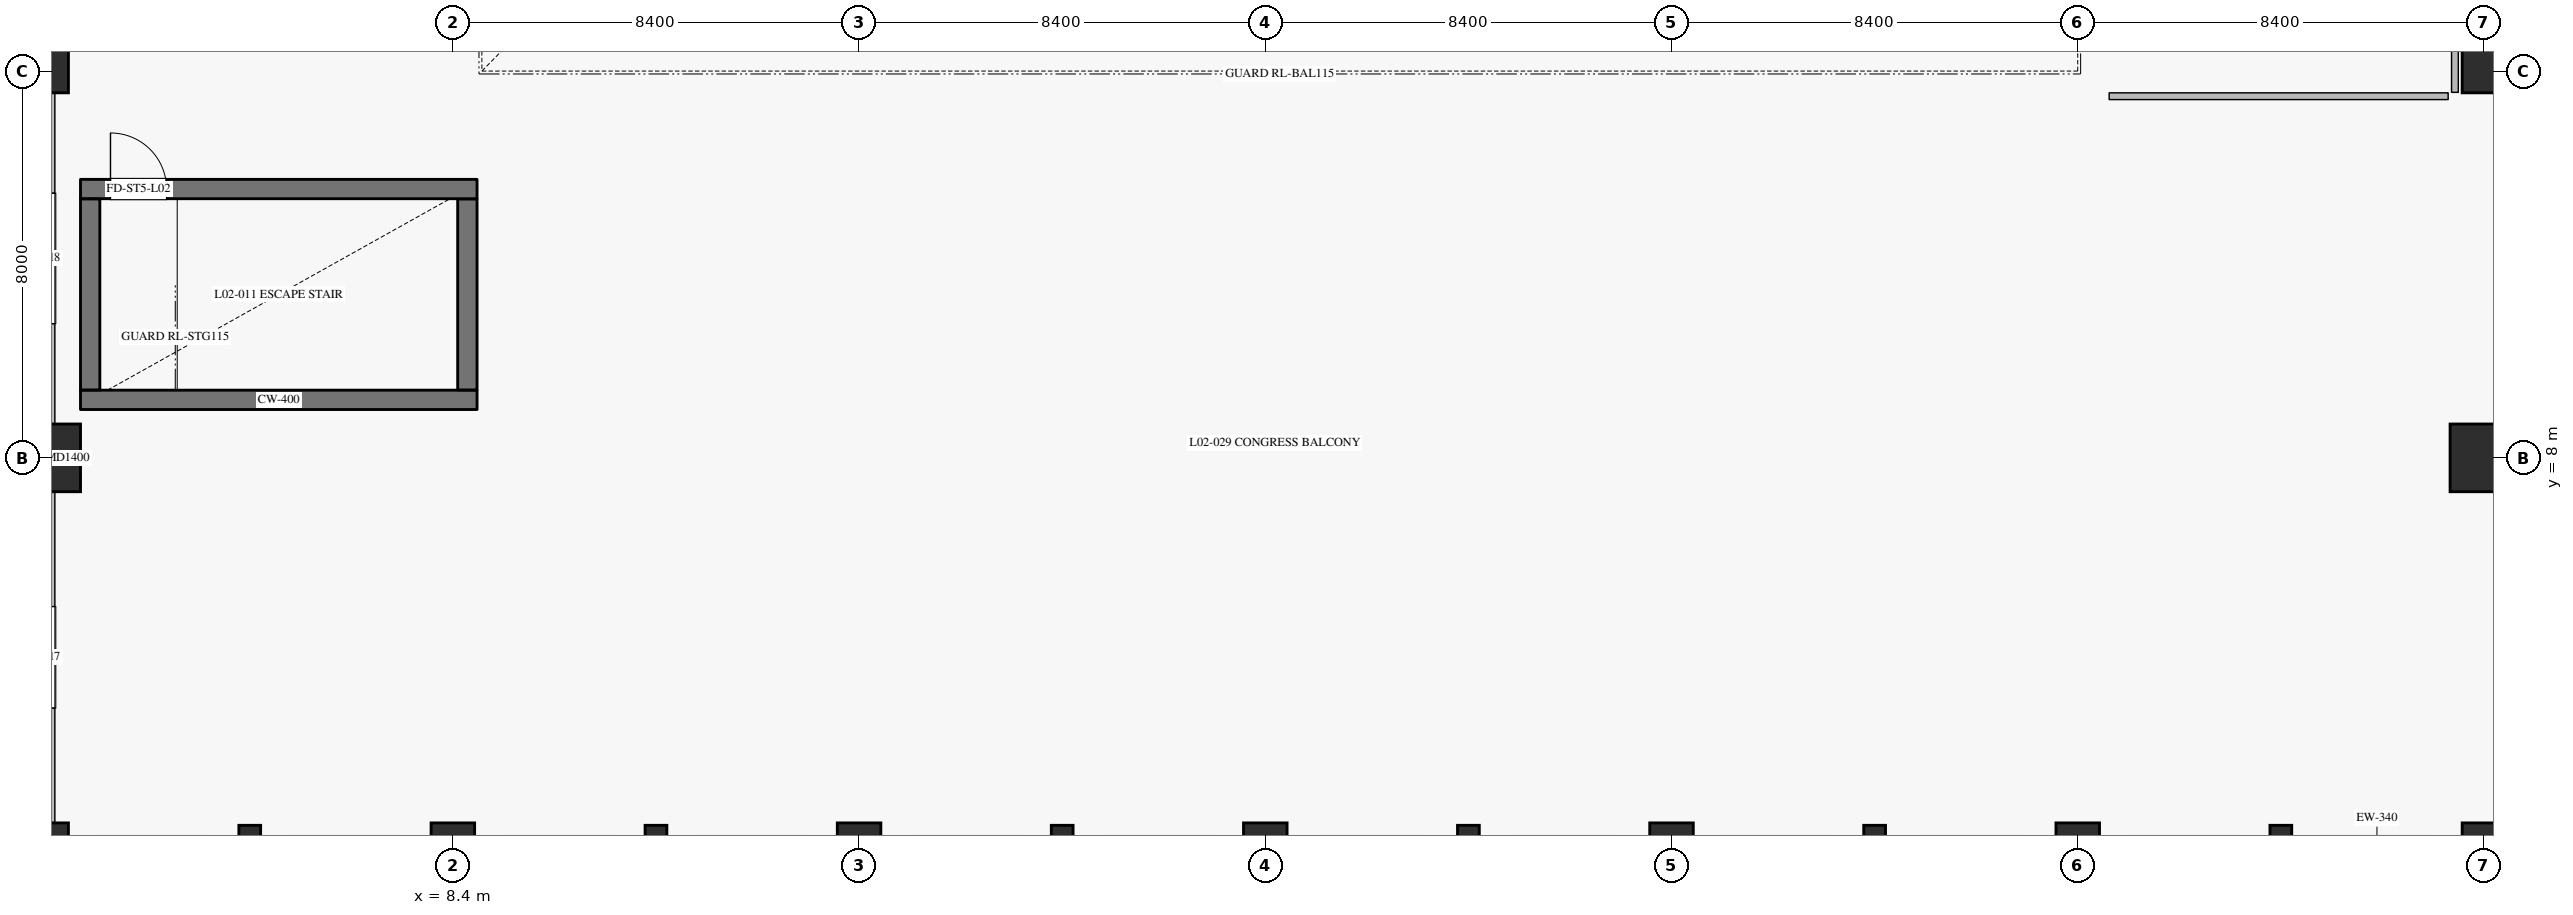
"""IFC4 building model, lengths in metres.
Left out: names, types, materials, properties, quantities, classifications, styles, units other than length and angle.
Written with IfcOpenShell. Run it as: python <this file> out.ifc"""

import sys

from ifc_helpers import new_model, si_unit, direction, frame, frame_2d, origin, origin_with_axes, origin_2d, place, context, subcontext, project, spatial, rectangle, circle, extrude, element, fill, save


model = new_model("IFC4")
c1 = context("Model", 3, precision=1e-05, world=origin(), true_north=direction((0.0, 1.0)))
c2 = subcontext(c1, "Body", "Model", "MODEL_VIEW")
j1 = project(units=[si_unit("LENGTHUNIT", "METRE"), si_unit("PLANEANGLEUNIT", "RADIAN")], contexts=[c1])
p1 = place(None, origin())
s1 = spatial("IfcSite", under=j1, at=p1, CompositionType="ELEMENT")
p2 = place(p1, origin())
s2 = spatial("IfcBuilding", under=s1, at=p2, CompositionType="ELEMENT")
p3 = place(p2, frame((0.0, 0.0, 11.4)))
s3 = spatial("IfcBuildingStorey", under=s2, at=p3, CompositionType="ELEMENT", Elevation=11.4)
p4 = place(p3, origin_with_axes())
e1 = element("IfcColumn", 1, at=p4, inside=s3, PredefinedType="COLUMN", context=c2, shape_type="SweptSolid", body=[
    extrude(rectangle(XDim=0.9, YDim=0.9, at=origin_2d()), origin(), (0.0, 0.0, 1.0), 4.8),
])
p5 = place(p3, frame((0.0, 8.0, 0.0), z_axis=(0.0, 0.0, 1.0), x_axis=(1.0, 0.0, 0.0)))
e2 = element("IfcColumn", 2, at=p5, inside=s3, PredefinedType="COLUMN", context=c2, shape_type="SweptSolid", body=[
    extrude(circle(Radius=0.7, at=origin_2d()), origin(), (0.0, 0.0, 1.0), 4.8),
])
p6 = place(p3, frame((0.0, 16.0, 0.0), z_axis=(0.0, 0.0, 1.0), x_axis=(1.0, 0.0, 0.0)))
e3 = element("IfcColumn", 3, at=p6, inside=s3, PredefinedType="COLUMN", context=c2, shape_type="SweptSolid", body=[
    extrude(rectangle(XDim=0.9, YDim=0.9, at=origin_2d()), origin(), (0.0, 0.0, 1.0), 4.8),
])
p7 = place(p3, frame((4.2, 0.0, 0.0), z_axis=(0.0, 0.0, 1.0), x_axis=(1.0, 0.0, 0.0)))
e4 = element("IfcColumn", 4, at=p7, inside=s3, PredefinedType="PILASTER", context=c2, shape_type="SweptSolid", body=[
    extrude(rectangle(XDim=0.45, YDim=0.8, at=origin_2d()), origin(), (0.0, 0.0, 1.0), 4.8),
])
p8 = place(p3, frame((8.4, 0.0, 0.0), z_axis=(0.0, 0.0, 1.0), x_axis=(1.0, 0.0, 0.0)))
e5 = element("IfcColumn", 5, at=p8, inside=s3, PredefinedType="COLUMN", context=c2, shape_type="SweptSolid", body=[
    extrude(rectangle(XDim=0.9, YDim=0.9, at=origin_2d()), origin(), (0.0, 0.0, 1.0), 4.8),
])
p9 = place(p3, frame((12.6, 0.0, 0.0), z_axis=(0.0, 0.0, 1.0), x_axis=(1.0, 0.0, 0.0)))
e6 = element("IfcColumn", 6, at=p9, inside=s3, PredefinedType="PILASTER", context=c2, shape_type="SweptSolid", body=[
    extrude(rectangle(XDim=0.45, YDim=0.8, at=origin_2d()), origin(), (0.0, 0.0, 1.0), 4.8),
])
p10 = place(p3, frame((16.8, 0.0, 0.0), z_axis=(0.0, 0.0, 1.0), x_axis=(1.0, 0.0, 0.0)))
e7 = element("IfcColumn", 7, at=p10, inside=s3, PredefinedType="COLUMN", context=c2, shape_type="SweptSolid", body=[
    extrude(rectangle(XDim=0.9, YDim=0.9, at=origin_2d()), origin(), (0.0, 0.0, 1.0), 4.8),
])
p11 = place(p3, frame((21.0, 0.0, 0.0), z_axis=(0.0, 0.0, 1.0), x_axis=(1.0, 0.0, 0.0)))
e8 = element("IfcColumn", 8, at=p11, inside=s3, PredefinedType="PILASTER", context=c2, shape_type="SweptSolid", body=[
    extrude(rectangle(XDim=0.45, YDim=0.8, at=origin_2d()), origin(), (0.0, 0.0, 1.0), 4.8),
])
p12 = place(p3, frame((25.2, 0.0, 0.0), z_axis=(0.0, 0.0, 1.0), x_axis=(1.0, 0.0, 0.0)))
e9 = element("IfcColumn", 9, at=p12, inside=s3, PredefinedType="COLUMN", context=c2, shape_type="SweptSolid", body=[
    extrude(rectangle(XDim=0.9, YDim=0.9, at=origin_2d()), origin(), (0.0, 0.0, 1.0), 4.8),
])
p13 = place(p3, frame((29.4, 0.0, 0.0), z_axis=(0.0, 0.0, 1.0), x_axis=(1.0, 0.0, 0.0)))
e10 = element("IfcColumn", 10, at=p13, inside=s3, PredefinedType="PILASTER", context=c2, shape_type="SweptSolid", body=[
    extrude(rectangle(XDim=0.45, YDim=0.8, at=origin_2d()), origin(), (0.0, 0.0, 1.0), 4.8),
])
p14 = place(p3, frame((33.6, 0.0, 0.0), z_axis=(0.0, 0.0, 1.0), x_axis=(1.0, 0.0, 0.0)))
e11 = element("IfcColumn", 11, at=p14, inside=s3, PredefinedType="COLUMN", context=c2, shape_type="SweptSolid", body=[
    extrude(rectangle(XDim=0.9, YDim=0.9, at=origin_2d()), origin(), (0.0, 0.0, 1.0), 4.8),
])
p15 = place(p3, frame((37.8, 0.0, 0.0), z_axis=(0.0, 0.0, 1.0), x_axis=(1.0, 0.0, 0.0)))
e12 = element("IfcColumn", 12, at=p15, inside=s3, PredefinedType="PILASTER", context=c2, shape_type="SweptSolid", body=[
    extrude(rectangle(XDim=0.45, YDim=0.8, at=origin_2d()), origin(), (0.0, 0.0, 1.0), 4.8),
])
p16 = place(p3, frame((42.0, 0.0, 0.0), z_axis=(0.0, 0.0, 1.0), x_axis=(1.0, 0.0, 0.0)))
e13 = element("IfcColumn", 13, at=p16, inside=s3, PredefinedType="COLUMN", context=c2, shape_type="SweptSolid", body=[
    extrude(rectangle(XDim=0.9, YDim=0.9, at=origin_2d()), origin(), (0.0, 0.0, 1.0), 4.8),
])
p17 = place(p3, frame((46.2, 0.0, 0.0), z_axis=(0.0, 0.0, 1.0), x_axis=(1.0, 0.0, 0.0)))
e14 = element("IfcColumn", 14, at=p17, inside=s3, PredefinedType="PILASTER", context=c2, shape_type="SweptSolid", body=[
    extrude(rectangle(XDim=0.45, YDim=0.8, at=origin_2d()), origin(), (0.0, 0.0, 1.0), 4.8),
])
p18 = place(p3, frame((50.4, 0.0, 0.0), z_axis=(0.0, 0.0, 1.0), x_axis=(1.0, 0.0, 0.0)))
e15 = element("IfcColumn", 15, at=p18, inside=s3, PredefinedType="COLUMN", context=c2, shape_type="SweptSolid", body=[
    extrude(rectangle(XDim=0.9, YDim=0.9, at=origin_2d()), origin(), (0.0, 0.0, 1.0), 4.8),
])
p19 = place(p3, frame((50.4, 8.0, 0.0), z_axis=(0.0, 0.0, 1.0), x_axis=(1.0, 0.0, 0.0)))
e16 = element("IfcColumn", 16, at=p19, inside=s3, PredefinedType="COLUMN", context=c2, shape_type="SweptSolid", body=[
    extrude(circle(Radius=0.7, at=origin_2d()), origin(), (0.0, 0.0, 1.0), 4.8),
])
p20 = place(p3, frame((50.4, 16.0, 0.0), z_axis=(0.0, 0.0, 1.0), x_axis=(1.0, 0.0, 0.0)))
e17 = element("IfcColumn", 17, at=p20, inside=s3, PredefinedType="COLUMN", context=c2, shape_type="SweptSolid", body=[
    extrude(rectangle(XDim=0.9, YDim=0.9, at=origin_2d()), origin(), (0.0, 0.0, 1.0), 4.8),
])
p21 = place(p3, frame((0.0, 0.45, 0.0), z_axis=(0.0, 0.0, 1.0), x_axis=(0.0, 1.0, 0.0)))
e18 = element("IfcWall", 18, at=p21, inside=s3, PredefinedType="SOLIDWALL", context=c2, shape_type="SweptSolid", body=[
    extrude(rectangle(XDim=6.85, YDim=0.34, at=frame_2d((3.425, 0.0))), origin(), (0.0, 0.0, 1.0), 3.6),
])
p22 = place(p21, frame((2.375, 0.0, 1.4)))
e19 = element("IfcOpeningElement", 19, at=p22, cuts=e18, PredefinedType="OPENING", context=c2, shape_type="SweptSolid", body=[
    extrude(rectangle(XDim=2.1, YDim=1.1, at=frame_2d((1.05, 0.55))), frame((0.0, 0.18, 0.0), z_axis=(0.0, -1.0, 0.0), x_axis=(1.0, 0.0, 0.0)), (0.0, 0.0, 1.0), 0.36),
])
p23 = place(p3, frame((0.0, 8.7, 0.0), z_axis=(0.0, 0.0, 1.0), x_axis=(0.0, 1.0, 0.0)))
e20 = element("IfcWall", 20, at=p23, inside=s3, PredefinedType="SOLIDWALL", context=c2, shape_type="SweptSolid", body=[
    extrude(rectangle(XDim=6.85, YDim=0.34, at=frame_2d((3.425, 0.0))), origin(), (0.0, 0.0, 1.0), 3.6),
])
p24 = place(p23, frame((2.075, 0.0, 1.4)))
e21 = element("IfcOpeningElement", 21, at=p24, cuts=e20, PredefinedType="OPENING", context=c2, shape_type="SweptSolid", body=[
    extrude(rectangle(XDim=2.7, YDim=1.2, at=frame_2d((1.35, 0.6))), frame((0.0, 0.18, 0.0), z_axis=(0.0, -1.0, 0.0), x_axis=(1.0, 0.0, 0.0)), (0.0, 0.0, 1.0), 0.36),
])
p25 = place(p3, frame((0.7, 9.2, 0.0), z_axis=(0.0, 0.0, 1.0), x_axis=(1.0, 0.0, 0.0)))
e22 = element("IfcWall", 22, at=p25, inside=s3, PredefinedType="SHEAR", context=c2, shape_type="SweptSolid", body=[
    extrude(rectangle(XDim=8.2, YDim=0.4, at=frame_2d((4.1, 0.0))), origin(), (0.0, 0.0, 1.0), 4.535),
])
p26 = place(p3, frame((8.7, 9.405, 0.0), z_axis=(0.0, 0.0, 1.0), x_axis=(0.0, 1.0, 0.0)))
e23 = element("IfcWall", 23, at=p26, inside=s3, PredefinedType="SHEAR", context=c2, shape_type="SweptSolid", body=[
    extrude(rectangle(XDim=3.95, YDim=0.4, at=frame_2d((1.975, 0.0))), origin(), (0.0, 0.0, 1.0), 4.535),
])
p27 = place(p3, frame((0.7, 13.56, 0.0), z_axis=(0.0, 0.0, 1.0), x_axis=(1.0, 0.0, 0.0)))
e24 = element("IfcWall", 24, at=p27, inside=s3, PredefinedType="SHEAR", context=c2, shape_type="SweptSolid", body=[
    extrude(rectangle(XDim=8.2, YDim=0.4, at=frame_2d((4.1, 0.0))), origin(), (0.0, 0.0, 1.0), 4.535),
])
p28 = place(p27, frame((0.62, 0.0, 0.0)))
e25 = element("IfcOpeningElement", 25, at=p28, cuts=e24, PredefinedType="OPENING", context=c2, shape_type="SweptSolid", body=[
    extrude(rectangle(XDim=1.16, YDim=2.2, at=frame_2d((0.58, 1.1))), frame((0.0, 0.21, 0.0), z_axis=(0.0, -1.0, 0.0), x_axis=(1.0, 0.0, 0.0)), (0.0, 0.0, 1.0), 0.42),
])
p29 = place(p3, frame((0.9, 9.405, 0.0), z_axis=(0.0, 0.0, 1.0), x_axis=(0.0, 1.0, 0.0)))
e26 = element("IfcWall", 26, at=p29, inside=s3, PredefinedType="SHEAR", context=c2, shape_type="SweptSolid", body=[
    extrude(rectangle(XDim=3.95, YDim=0.4, at=frame_2d((1.975, 0.0))), origin(), (0.0, 0.0, 1.0), 4.535),
])
p30 = place(p3, frame((49.8, 15.56, 0.0), z_axis=(0.0, 0.0, 1.0), x_axis=(0.0, 1.0, 0.0)))
e27 = element("IfcWall", 27, at=p30, inside=s3, PredefinedType="PARTITIONING", context=c2, shape_type="SweptSolid", body=[
    extrude(rectangle(XDim=34.08, YDim=0.14, at=frame_2d((17.04, 0.0))), origin(), (0.0, 0.0, 1.0), 4.535),
])
p31 = place(p30, frame((12.92, 0.0, 0.0)))
e28 = element("IfcOpeningElement", 28, at=p31, cuts=e27, PredefinedType="OPENING", context=c2, shape_type="SweptSolid", body=[
    extrude(rectangle(XDim=1.9, YDim=2.4, at=frame_2d((0.95, 1.2))), frame((0.0, 0.08, 0.0), z_axis=(0.0, -1.0, 0.0), x_axis=(1.0, 0.0, 0.0)), (0.0, 0.0, 1.0), 0.16),
])
p32 = place(p3, frame((42.65, 15.48, 0.0), z_axis=(0.0, 0.0, 1.0), x_axis=(1.0, 0.0, 0.0)))
e29 = element("IfcWall", 29, at=p32, inside=s3, PredefinedType="PARTITIONING", context=c2, shape_type="SweptSolid", body=[
    extrude(rectangle(XDim=7.01, YDim=0.14, at=frame_2d((3.505, 0.0))), origin(), (0.0, 0.0, 1.0), 4.535),
])
p33 = place(p28, origin())
e30 = element("IfcDoor", 30, at=p33, inside=s3, OperationType="SINGLE_SWING_LEFT", PredefinedType="DOOR", context=c2, shape_type="SweptSolid", body=[
    extrude(rectangle(XDim=1.16, YDim=2.2, at=frame_2d((0.58, 1.1))), frame((0.0, 0.025, 0.0), z_axis=(0.0, -1.0, 0.0), x_axis=(1.0, 0.0, 0.0)), (0.0, 0.0, 1.0), 0.05),
])
fill(e25, e30)
save(model, sys.argv[1])
